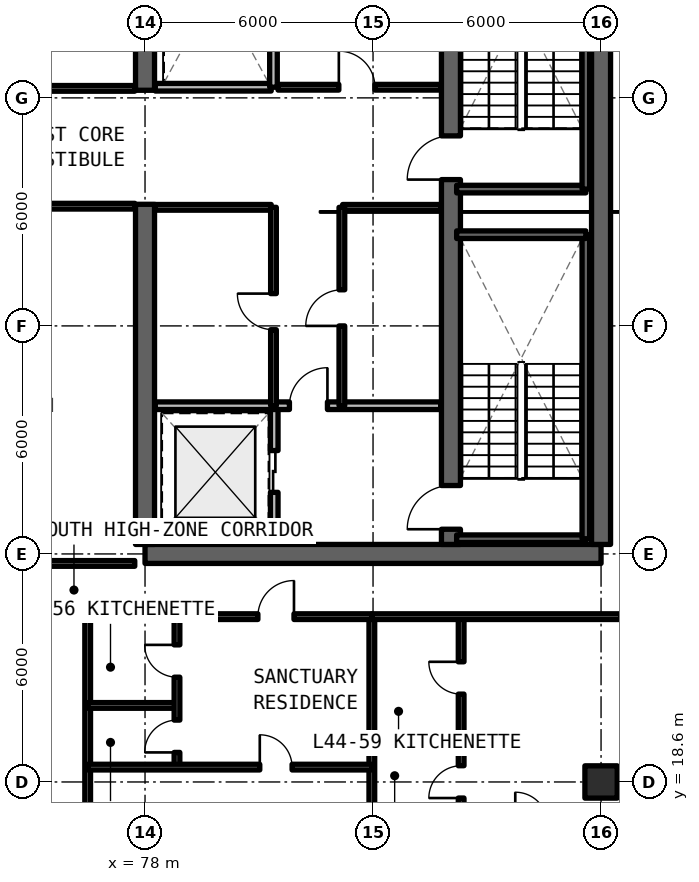
"""IFC4 building model, lengths in metres.
Left out: names, types, materials, properties, quantities, classifications, styles, units other than length and angle.
Written with IfcOpenShell. Run it as: python <this file> out.ifc"""

import sys

from ifc_helpers import new_model, si_unit, direction, frame, frame_2d, origin, origin_2d, place, context, subcontext, project, spatial, rectangle, extrude, element, fill, save


model = new_model("IFC4")
c1 = context("Model", 3, precision=1e-05, world=origin(), true_north=direction((0.0, 1.0)))
c2 = subcontext(c1, "Body", "Model", "MODEL_VIEW")
j1 = project(units=[si_unit("LENGTHUNIT", "METRE"), si_unit("PLANEANGLEUNIT", "RADIAN")], contexts=[c1])
p1 = place(None, origin())
s1 = spatial("IfcSite", under=j1, at=p1, CompositionType="ELEMENT")
p2 = place(p1, origin())
s2 = spatial("IfcBuilding", under=s1, at=p2, CompositionType="ELEMENT")
p3 = place(p2, frame((0.0, 0.0, 158.4)))
s3 = spatial("IfcBuildingStorey", under=s2, at=p3, CompositionType="ELEMENT", Elevation=158.4)
p4 = place(p3, frame((78.0, 24.6, 0.0), z_axis=(0.0, 0.0, 1.0), x_axis=(1.0, 0.0, 0.0)))
e1 = element("IfcWall", 1, at=p4, inside=s3, PredefinedType="SHEAR", context=c2, shape_type="SweptSolid", body=[
    extrude(rectangle(XDim=12.0, YDim=0.5, at=frame_2d((6.0, 0.0))), origin(), (0.0, 0.0, 1.0), 3.63),
])
p5 = place(p3, frame((90.0, 24.85, 0.0), z_axis=(0.0, 0.0, 1.0), x_axis=(0.0, 1.0, 0.0)))
e2 = element("IfcWall", 2, at=p5, inside=s3, PredefinedType="SHEAR", context=c2, shape_type="SweptSolid", body=[
    extrude(rectangle(XDim=17.5, YDim=0.5, at=frame_2d((8.75, 0.0))), origin(), (0.0, 0.0, 1.0), 3.63),
])
p6 = place(p3, frame((78.0, 24.85, 0.0), z_axis=(0.0, 0.0, 1.0), x_axis=(0.0, 1.0, 0.0)))
e3 = element("IfcWall", 3, at=p6, inside=s3, PredefinedType="SHEAR", context=c2, shape_type="SweptSolid", body=[
    extrude(rectangle(XDim=8.95, YDim=0.5, at=frame_2d((4.475, 0.0))), origin(), (0.0, 0.0, 1.0), 3.63),
])
p7 = place(p3, frame((78.0, 36.8, 0.0), z_axis=(0.0, 0.0, 1.0), x_axis=(0.0, 1.0, 0.0)))
e4 = element("IfcWall", 4, at=p7, inside=s3, PredefinedType="SHEAR", context=c2, shape_type="SweptSolid", body=[
    extrude(rectangle(XDim=5.55, YDim=0.5, at=frame_2d((2.775, 0.0))), origin(), (0.0, 0.0, 1.0), 3.63),
])
p8 = place(p3, frame((86.05, 24.85, 0.0), z_axis=(0.0, 0.0, 1.0), x_axis=(0.0, 1.0, 0.0)))
e5 = element("IfcWall", 5, at=p8, inside=s3, PredefinedType="SHEAR", context=c2, shape_type="SweptSolid", body=[
    extrude(rectangle(XDim=17.5, YDim=0.5, at=frame_2d((8.75, 0.0))), origin(), (0.0, 0.0, 1.0), 3.63),
])
p9 = place(p8, frame((0.4, 0.0, 0.0)))
e6 = element("IfcOpeningElement", 6, at=p9, cuts=e5, PredefinedType="OPENING", context=c2, shape_type="SweptSolid", body=[
    extrude(rectangle(XDim=1.15, YDim=2.15, at=frame_2d((0.575, 1.075))), frame((0.0, 0.26, 0.0), z_axis=(0.0, -1.0, 0.0), x_axis=(1.0, 0.0, 0.0)), (0.0, 0.0, 1.0), 0.52),
])
p10 = place(p8, frame((9.6, 0.0, 0.0)))
e7 = element("IfcOpeningElement", 7, at=p10, cuts=e5, PredefinedType="OPENING", context=c2, shape_type="SweptSolid", body=[
    extrude(rectangle(XDim=1.15, YDim=2.15, at=frame_2d((0.575, 1.075))), frame((0.0, 0.26, 0.0), z_axis=(0.0, -1.0, 0.0), x_axis=(1.0, 0.0, 0.0)), (0.0, 0.0, 1.0), 0.52),
])
p11 = place(p3, frame((90.0, 18.6, 0.0), z_axis=(0.0, 0.0, 1.0), x_axis=(1.0, 0.0, 0.0)))
e8 = element("IfcColumn", 8, at=p11, inside=s3, PredefinedType="COLUMN", context=c2, shape_type="SweptSolid", body=[
    extrude(rectangle(XDim=0.85, YDim=0.85, at=origin_2d()), origin(), (0.0, 0.0, 1.0), 3.63),
])
p12 = place(p3, frame((81.4, 24.92, 0.0), z_axis=(0.0, 0.0, 1.0), x_axis=(0.0, 1.0, 0.0)))
e9 = element("IfcWall", 9, at=p12, inside=s3, PredefinedType="SOLIDWALL", context=c2, shape_type="SweptSolid", body=[
    extrude(rectangle(XDim=3.58, YDim=0.2, at=frame_2d((1.79, 0.0))), origin(), (0.0, 0.0, 1.0), 2.63),
])
p13 = place(p12, frame((1.3, 0.0, 0.0)))
e10 = element("IfcOpeningElement", 10, at=p13, cuts=e9, PredefinedType="OPENING", context=c2, shape_type="SweptSolid", body=[
    extrude(rectangle(XDim=1.1, YDim=2.2, at=frame_2d((0.55, 1.1))), frame((0.0, 0.11, 0.0), z_axis=(0.0, -1.0, 0.0), x_axis=(1.0, 0.0, 0.0)), (0.0, 0.0, 1.0), 0.22),
])
p14 = place(p3, frame((78.27, 28.5, 0.0), z_axis=(0.0, 0.0, 1.0), x_axis=(1.0, 0.0, 0.0)))
e11 = element("IfcWall", 11, at=p14, inside=s3, PredefinedType="SOLIDWALL", context=c2, shape_type="SweptSolid", body=[
    extrude(rectangle(XDim=7.51, YDim=0.2, at=frame_2d((3.755, 0.0))), origin(), (0.0, 0.0, 1.0), 2.63),
])
p15 = place(p14, frame((3.53, 0.0, 0.0)))
e12 = element("IfcOpeningElement", 12, at=p15, cuts=e11, PredefinedType="OPENING", context=c2, shape_type="SweptSolid", body=[
    extrude(rectangle(XDim=1.0, YDim=2.15, at=frame_2d((0.5, 1.075))), frame((0.0, 0.11, 0.0), z_axis=(0.0, -1.0, 0.0), x_axis=(1.0, 0.0, 0.0)), (0.0, 0.0, 1.0), 0.22),
])
p16 = place(p3, frame((83.2, 33.72, 0.0), z_axis=(0.0, 0.0, 1.0), x_axis=(1.0, 0.0, 0.0)))
e13 = element("IfcWall", 13, at=p16, inside=s3, PredefinedType="SOLIDWALL", context=c2, shape_type="SweptSolid", body=[
    extrude(rectangle(XDim=2.58, YDim=0.15, at=frame_2d((1.29, 0.0))), origin(), (0.0, 0.0, 1.0), 2.63),
])
p17 = place(p3, frame((83.18, 28.5, 0.0), z_axis=(0.0, 0.0, 1.0), x_axis=(0.0, 1.0, 0.0)))
e14 = element("IfcWall", 14, at=p17, inside=s3, PredefinedType="SOLIDWALL", context=c2, shape_type="SweptSolid", body=[
    extrude(rectangle(XDim=5.22, YDim=0.15, at=frame_2d((2.61, 0.0))), origin(), (0.0, 0.0, 1.0), 2.63),
])
p18 = place(p17, frame((2.1, 0.0, 0.0)))
e15 = element("IfcOpeningElement", 15, at=p18, cuts=e14, PredefinedType="OPENING", context=c2, shape_type="SweptSolid", body=[
    extrude(rectangle(XDim=0.95, YDim=2.15, at=frame_2d((0.475, 1.075))), frame((0.0, 0.085, 0.0), z_axis=(0.0, -1.0, 0.0), x_axis=(1.0, 0.0, 0.0)), (0.0, 0.0, 1.0), 0.17),
])
p19 = place(p3, frame((78.27, 33.72, 0.0), z_axis=(0.0, 0.0, 1.0), x_axis=(1.0, 0.0, 0.0)))
e16 = element("IfcWall", 16, at=p19, inside=s3, PredefinedType="SOLIDWALL", context=c2, shape_type="SweptSolid", body=[
    extrude(rectangle(XDim=3.05, YDim=0.15, at=frame_2d((1.525, 0.0))), origin(), (0.0, 0.0, 1.0), 2.63),
])
p20 = place(p3, frame((81.38, 28.5, 0.0), z_axis=(0.0, 0.0, 1.0), x_axis=(0.0, 1.0, 0.0)))
e17 = element("IfcWall", 17, at=p20, inside=s3, PredefinedType="SOLIDWALL", context=c2, shape_type="SweptSolid", body=[
    extrude(rectangle(XDim=5.22, YDim=0.15, at=frame_2d((2.61, 0.0))), origin(), (0.0, 0.0, 1.0), 2.63),
])
p21 = place(p20, frame((2.0, 0.0, 0.0)))
e18 = element("IfcOpeningElement", 18, at=p21, cuts=e17, PredefinedType="OPENING", context=c2, shape_type="SweptSolid", body=[
    extrude(rectangle(XDim=0.95, YDim=2.15, at=frame_2d((0.475, 1.075))), frame((0.0, 0.085, 0.0), z_axis=(0.0, -1.0, 0.0), x_axis=(1.0, 0.0, 0.0)), (0.0, 0.0, 1.0), 0.17),
])
p22 = place(p3, frame((81.5, 36.88, 0.0), z_axis=(0.0, 0.0, 1.0), x_axis=(1.0, 0.0, 0.0)))
e19 = element("IfcWall", 19, at=p22, inside=s3, PredefinedType="SOLIDWALL", context=c2, shape_type="SweptSolid", body=[
    extrude(rectangle(XDim=4.28, YDim=0.15, at=frame_2d((2.14, 0.0))), origin(), (0.0, 0.0, 1.0), 2.63),
])
p23 = place(p22, frame((1.6, 0.0, 0.0)))
e20 = element("IfcOpeningElement", 20, at=p23, cuts=e19, PredefinedType="OPENING", context=c2, shape_type="SweptSolid", body=[
    extrude(rectangle(XDim=0.95, YDim=2.15, at=frame_2d((0.475, 1.075))), frame((0.0, 0.085, 0.0), z_axis=(0.0, -1.0, 0.0), x_axis=(1.0, 0.0, 0.0)), (0.0, 0.0, 1.0), 0.17),
])
p24 = place(p3, frame((78.27, 36.88, 0.0), z_axis=(0.0, 0.0, 1.0), x_axis=(1.0, 0.0, 0.0)))
e21 = element("IfcWall", 21, at=p24, inside=s3, PredefinedType="SOLIDWALL", context=c2, shape_type="SweptSolid", body=[
    extrude(rectangle(XDim=3.05, YDim=0.2, at=frame_2d((1.525, 0.0))), origin(), (0.0, 0.0, 1.0), 2.63),
])
p25 = place(p3, frame((81.38, 36.88, 0.0), z_axis=(0.0, 0.0, 1.0), x_axis=(0.0, 1.0, 0.0)))
e22 = element("IfcWall", 22, at=p25, inside=s3, PredefinedType="SOLIDWALL", context=c2, shape_type="SweptSolid", body=[
    extrude(rectangle(XDim=5.42, YDim=0.2, at=frame_2d((2.71, 0.0))), origin(), (0.0, 0.0, 1.0), 2.63),
])
p26 = place(p3, frame((69.85, 24.35, 0.0), z_axis=(0.0, 0.0, 1.0), x_axis=(1.0, 0.0, 0.0)))
e23 = element("IfcWall", 23, at=p26, inside=s3, PredefinedType="SOLIDWALL", context=c2, shape_type="SweptSolid", body=[
    extrude(rectangle(XDim=7.88, YDim=0.15, at=frame_2d((3.94, 0.0))), origin(), (0.0, 0.0, 1.0), 2.63),
])
p27 = place(p3, frame((69.85, 33.75, 0.0), z_axis=(0.0, 0.0, 1.0), x_axis=(1.0, 0.0, 0.0)))
e24 = element("IfcWall", 24, at=p27, inside=s3, PredefinedType="SOLIDWALL", context=c2, shape_type="SweptSolid", body=[
    extrude(rectangle(XDim=7.88, YDim=0.15, at=frame_2d((3.94, 0.0))), origin(), (0.0, 0.0, 1.0), 2.63),
])
p28 = place(p27, frame((3.465, 0.0, 0.0)))
e25 = element("IfcOpeningElement", 25, at=p28, cuts=e24, PredefinedType="OPENING", context=c2, shape_type="SweptSolid", body=[
    extrude(rectangle(XDim=0.95, YDim=2.15, at=frame_2d((0.475, 1.075))), frame((0.0, 0.085, 0.0), z_axis=(0.0, -1.0, 0.0), x_axis=(1.0, 0.0, 0.0)), (0.0, 0.0, 1.0), 0.17),
])
p29 = place(p3, frame((69.85, 36.85, 0.0), z_axis=(0.0, 0.0, 1.0), x_axis=(1.0, 0.0, 0.0)))
e26 = element("IfcWall", 26, at=p29, inside=s3, PredefinedType="SOLIDWALL", context=c2, shape_type="SweptSolid", body=[
    extrude(rectangle(XDim=7.88, YDim=0.15, at=frame_2d((3.94, 0.0))), origin(), (0.0, 0.0, 1.0), 2.63),
])
p30 = place(p29, frame((3.465, 0.0, 0.0)))
e27 = element("IfcOpeningElement", 27, at=p30, cuts=e26, PredefinedType="OPENING", context=c2, shape_type="SweptSolid", body=[
    extrude(rectangle(XDim=0.95, YDim=2.15, at=frame_2d((0.475, 1.075))), frame((0.0, 0.085, 0.0), z_axis=(0.0, -1.0, 0.0), x_axis=(1.0, 0.0, 0.0)), (0.0, 0.0, 1.0), 0.17),
])
p31 = place(p3, frame((76.491, 14.566, 0.0), z_axis=(0.0, 0.0, 1.0), x_axis=(0.0, 1.0, 0.0)))
e28 = element("IfcWall", 28, at=p31, inside=s3, PredefinedType="SOLIDWALL", context=c2, shape_type="SweptSolid", body=[
    extrude(rectangle(XDim=8.384, YDim=0.15, at=frame_2d((4.192, 0.0))), origin(), (0.0, 0.0, 1.0), 2.63),
])
p32 = place(p3, frame((66.521, 22.95, 0.0), z_axis=(0.0, 0.0, 1.0), x_axis=(1.0, 0.0, 0.0)))
e29 = element("IfcWall", 29, at=p32, inside=s3, PredefinedType="SOLIDWALL", context=c2, shape_type="SweptSolid", body=[
    extrude(rectangle(XDim=9.97, YDim=0.15, at=frame_2d((4.985, 0.0))), origin(), (0.0, 0.0, 1.0), 2.63),
])
p33 = place(p32, frame((3.635, 0.0, 0.0)))
e30 = element("IfcOpeningElement", 30, at=p33, cuts=e29, PredefinedType="OPENING", context=c2, shape_type="SweptSolid", body=[
    extrude(rectangle(XDim=1.1, YDim=2.15, at=frame_2d((0.55, 1.075))), frame((0.0, 0.085, 0.0), z_axis=(0.0, -1.0, 0.0), x_axis=(1.0, 0.0, 0.0)), (0.0, 0.0, 1.0), 0.17),
])
p34 = place(p3, frame((83.969, 14.89, 0.0), z_axis=(0.0, 0.0, 1.0), x_axis=(0.0, 1.0, 0.0)))
e31 = element("IfcWall", 31, at=p34, inside=s3, PredefinedType="SOLIDWALL", context=c2, shape_type="SweptSolid", body=[
    extrude(rectangle(XDim=8.06, YDim=0.15, at=frame_2d((4.03, 0.0))), origin(), (0.0, 0.0, 1.0), 2.63),
])
p35 = place(p3, frame((76.491, 20.614, 0.0), z_axis=(0.0, 0.0, 1.0), x_axis=(1.0, 0.0, 0.0)))
e32 = element("IfcWall", 32, at=p35, inside=s3, PredefinedType="PARTITIONING", context=c2, shape_type="SweptSolid", body=[
    extrude(rectangle(XDim=2.35, YDim=0.15, at=frame_2d((1.175, 0.0))), origin(), (0.0, 0.0, 1.0), 2.63),
])
p36 = place(p3, frame((78.841, 18.991, 0.0), z_axis=(0.0, 0.0, 1.0), x_axis=(0.0, 1.0, 0.0)))
e33 = element("IfcWall", 33, at=p36, inside=s3, PredefinedType="PARTITIONING", context=c2, shape_type="SweptSolid", body=[
    extrude(rectangle(XDim=3.959, YDim=0.15, at=frame_2d((1.979, 0.0))), origin(), (0.0, 0.0, 1.0), 2.63),
])
p37 = place(p36, frame((0.387, 0.0, 0.0)))
e34 = element("IfcOpeningElement", 34, at=p37, cuts=e33, PredefinedType="OPENING", context=c2, shape_type="SweptSolid", body=[
    extrude(rectangle(XDim=0.85, YDim=2.1, at=frame_2d((0.425, 1.05))), frame((0.0, 0.085, 0.0), z_axis=(0.0, -1.0, 0.0), x_axis=(1.0, 0.0, 0.0)), (0.0, 0.0, 1.0), 0.17),
])
p38 = place(p36, frame((2.366, 0.0, 0.0)))
e35 = element("IfcOpeningElement", 35, at=p38, cuts=e33, PredefinedType="OPENING", context=c2, shape_type="SweptSolid", body=[
    extrude(rectangle(XDim=0.85, YDim=2.1, at=frame_2d((0.425, 1.05))), frame((0.0, 0.085, 0.0), z_axis=(0.0, -1.0, 0.0), x_axis=(1.0, 0.0, 0.0)), (0.0, 0.0, 1.0), 0.17),
])
p39 = place(p3, frame((76.491, 18.991, 0.0), z_axis=(0.0, 0.0, 1.0), x_axis=(1.0, 0.0, 0.0)))
e36 = element("IfcWall", 36, at=p39, inside=s3, PredefinedType="PARTITIONING", context=c2, shape_type="SweptSolid", body=[
    extrude(rectangle(XDim=7.478, YDim=0.15, at=frame_2d((3.739, 0.0))), origin(), (0.0, 0.0, 1.0), 2.63),
])
p40 = place(p39, frame((4.529, 0.0, 0.0)))
e37 = element("IfcOpeningElement", 37, at=p40, cuts=e36, PredefinedType="OPENING", context=c2, shape_type="SweptSolid", body=[
    extrude(rectangle(XDim=0.85, YDim=2.1, at=frame_2d((0.425, 1.05))), frame((0.0, 0.085, 0.0), z_axis=(0.0, -1.0, 0.0), x_axis=(1.0, 0.0, 0.0)), (0.0, 0.0, 1.0), 0.17),
])
p41 = place(p3, frame((76.491, 22.95, 0.0), z_axis=(0.0, 0.0, 1.0), x_axis=(1.0, 0.0, 0.0)))
e38 = element("IfcWall", 38, at=p41, inside=s3, PredefinedType="SOLIDWALL", context=c2, shape_type="SweptSolid", body=[
    extrude(rectangle(XDim=7.478, YDim=0.15, at=frame_2d((3.739, 0.0))), origin(), (0.0, 0.0, 1.0), 2.63),
])
p42 = place(p41, frame((4.479, 0.0, 0.0)))
e39 = element("IfcOpeningElement", 39, at=p42, cuts=e38, PredefinedType="OPENING", context=c2, shape_type="SweptSolid", body=[
    extrude(rectangle(XDim=0.95, YDim=2.15, at=frame_2d((0.475, 1.075))), frame((0.0, 0.085, 0.0), z_axis=(0.0, -1.0, 0.0), x_axis=(1.0, 0.0, 0.0)), (0.0, 0.0, 1.0), 0.17),
])
p43 = place(p3, frame((83.969, 19.723, 0.0), z_axis=(0.0, 0.0, 1.0), x_axis=(1.0, 0.0, 0.0)))
e40 = element("IfcWall", 40, at=p43, inside=s3, PredefinedType="PARTITIONING", context=c2, shape_type="SweptSolid", body=[
    extrude(rectangle(XDim=2.35, YDim=0.15, at=frame_2d((1.175, 0.0))), origin(), (0.0, 0.0, 1.0), 2.63),
])
p44 = place(p3, frame((86.318, 17.481, 0.0), z_axis=(0.0, 0.0, 1.0), x_axis=(0.0, 1.0, 0.0)))
e41 = element("IfcWall", 41, at=p44, inside=s3, PredefinedType="PARTITIONING", context=c2, shape_type="SweptSolid", body=[
    extrude(rectangle(XDim=5.469, YDim=0.15, at=frame_2d((2.734, 0.0))), origin(), (0.0, 0.0, 1.0), 2.63),
])
p45 = place(p44, frame((0.696, 0.0, 0.0)))
e42 = element("IfcOpeningElement", 42, at=p45, cuts=e41, PredefinedType="OPENING", context=c2, shape_type="SweptSolid", body=[
    extrude(rectangle(XDim=0.85, YDim=2.1, at=frame_2d((0.425, 1.05))), frame((0.0, 0.085, 0.0), z_axis=(0.0, -1.0, 0.0), x_axis=(1.0, 0.0, 0.0)), (0.0, 0.0, 1.0), 0.17),
])
p46 = place(p44, frame((3.431, 0.0, 0.0)))
e43 = element("IfcOpeningElement", 43, at=p46, cuts=e41, PredefinedType="OPENING", context=c2, shape_type="SweptSolid", body=[
    extrude(rectangle(XDim=0.85, YDim=2.1, at=frame_2d((0.425, 1.05))), frame((0.0, 0.085, 0.0), z_axis=(0.0, -1.0, 0.0), x_axis=(1.0, 0.0, 0.0)), (0.0, 0.0, 1.0), 0.17),
])
p47 = place(p3, frame((83.969, 22.95, 0.0), z_axis=(0.0, 0.0, 1.0), x_axis=(1.0, 0.0, 0.0)))
e44 = element("IfcWall", 44, at=p47, inside=s3, PredefinedType="SOLIDWALL", context=c2, shape_type="SweptSolid", body=[
    extrude(rectangle(XDim=11.632, YDim=0.15, at=frame_2d((5.816, 0.0))), origin(), (0.0, 0.0, 1.0), 2.63),
])
p48 = place(p47, frame((6.556, 0.0, 0.0)))
e45 = element("IfcOpeningElement", 45, at=p48, cuts=e44, PredefinedType="OPENING", context=c2, shape_type="SweptSolid", body=[
    extrude(rectangle(XDim=0.95, YDim=2.15, at=frame_2d((0.475, 1.075))), frame((0.0, 0.085, 0.0), z_axis=(0.0, -1.0, 0.0), x_axis=(1.0, 0.0, 0.0)), (0.0, 0.0, 1.0), 0.17),
])
p49 = place(p3, frame((86.2, 25.0, 0.0), z_axis=(0.0, 0.0, 1.0), x_axis=(1.0, 0.0, 0.0)))
e46 = element("IfcWall", 46, at=p49, inside=s3, PredefinedType="SOLIDWALL", context=c2, shape_type="SweptSolid", body=[
    extrude(rectangle(XDim=3.4, YDim=0.2, at=frame_2d((1.7, 0.0))), origin(), (0.0, 0.0, 1.0), 3.63),
])
p50 = place(p3, frame((89.6, 25.0, 0.0), z_axis=(0.0, 0.0, 1.0), x_axis=(0.0, 1.0, 0.0)))
e47 = element("IfcWall", 47, at=p50, inside=s3, PredefinedType="SOLIDWALL", context=c2, shape_type="SweptSolid", body=[
    extrude(rectangle(XDim=8.0, YDim=0.2, at=frame_2d((4.0, 0.0))), origin(), (0.0, 0.0, 1.0), 3.63),
])
for number, where, z_axis, x_axis in (
    (48, (89.6, 33.0, 0.0), (0.0, 0.0, 1.0), (-1.0, 0.0, 0.0)),
    (49, (86.2, 34.2, 0.0), (0.0, 0.0, 1.0), (1.0, 0.0, 0.0)),
):
    element("IfcWall", number, at=place(p3, frame(where, z_axis=z_axis, x_axis=x_axis)), inside=s3, PredefinedType="SOLIDWALL", context=c2, shape_type="SweptSolid", body=[
        extrude(rectangle(XDim=3.4, YDim=0.2, at=frame_2d((1.7, 0.0))), origin(), (0.0, 0.0, 1.0), 3.63),
    ])
p51 = place(p3, frame((89.6, 34.2, 0.0), z_axis=(0.0, 0.0, 1.0), x_axis=(0.0, 1.0, 0.0)))
e50 = element("IfcWall", 50, at=p51, inside=s3, PredefinedType="SOLIDWALL", context=c2, shape_type="SweptSolid", body=[
    extrude(rectangle(XDim=8.0, YDim=0.2, at=frame_2d((4.0, 0.0))), origin(), (0.0, 0.0, 1.0), 3.63),
])
p52 = place(p13, origin())
e51 = element("IfcDoor", 51, at=p52, inside=s3, OperationType="SLIDING_TO_LEFT", PredefinedType="DOOR", context=c2, shape_type="SweptSolid", body=[
    extrude(rectangle(XDim=1.1, YDim=2.2, at=frame_2d((0.55, 1.1))), frame((0.0, 0.025, 0.0), z_axis=(0.0, -1.0, 0.0), x_axis=(1.0, 0.0, 0.0)), (0.0, 0.0, 1.0), 0.05),
])
fill(e10, e51)
p53 = place(p15, origin())
e52 = element("IfcDoor", 52, at=p53, inside=s3, OperationType="SINGLE_SWING_RIGHT", PredefinedType="DOOR", context=c2, shape_type="SweptSolid", body=[
    extrude(rectangle(XDim=1.0, YDim=2.15, at=frame_2d((0.5, 1.075))), frame((0.0, 0.025, 0.0), z_axis=(0.0, -1.0, 0.0), x_axis=(1.0, 0.0, 0.0)), (0.0, 0.0, 1.0), 0.05),
])
fill(e12, e52)
p54 = place(p18, origin())
e53 = element("IfcDoor", 53, at=p54, inside=s3, OperationType="SINGLE_SWING_LEFT", PredefinedType="DOOR", context=c2, shape_type="SweptSolid", body=[
    extrude(rectangle(XDim=0.95, YDim=2.15, at=frame_2d((0.475, 1.075))), frame((0.0, 0.025, 0.0), z_axis=(0.0, -1.0, 0.0), x_axis=(1.0, 0.0, 0.0)), (0.0, 0.0, 1.0), 0.05),
])
fill(e15, e53)
p55 = place(p21, origin())
e54 = element("IfcDoor", 54, at=p55, inside=s3, OperationType="SINGLE_SWING_RIGHT", PredefinedType="DOOR", context=c2, shape_type="SweptSolid", body=[
    extrude(rectangle(XDim=0.95, YDim=2.15, at=frame_2d((0.475, 1.075))), frame((0.0, 0.025, 0.0), z_axis=(0.0, -1.0, 0.0), x_axis=(1.0, 0.0, 0.0)), (0.0, 0.0, 1.0), 0.05),
])
fill(e18, e54)
p56 = place(p23, origin())
e55 = element("IfcDoor", 55, at=p56, inside=s3, OperationType="SINGLE_SWING_LEFT", PredefinedType="DOOR", context=c2, shape_type="SweptSolid", body=[
    extrude(rectangle(XDim=0.95, YDim=2.15, at=frame_2d((0.475, 1.075))), frame((0.0, 0.025, 0.0), z_axis=(0.0, -1.0, 0.0), x_axis=(1.0, 0.0, 0.0)), (0.0, 0.0, 1.0), 0.05),
])
fill(e20, e55)
p57 = place(p37, origin())
e56 = element("IfcDoor", 56, at=p57, inside=s3, OperationType="SINGLE_SWING_LEFT", PredefinedType="DOOR", context=c2, shape_type="SweptSolid", body=[
    extrude(rectangle(XDim=0.85, YDim=2.1, at=frame_2d((0.425, 1.05))), frame((0.0, 0.025, 0.0), z_axis=(0.0, -1.0, 0.0), x_axis=(1.0, 0.0, 0.0)), (0.0, 0.0, 1.0), 0.05),
])
fill(e34, e56)
p58 = place(p38, origin())
e57 = element("IfcDoor", 57, at=p58, inside=s3, OperationType="SINGLE_SWING_RIGHT", PredefinedType="DOOR", context=c2, shape_type="SweptSolid", body=[
    extrude(rectangle(XDim=0.85, YDim=2.1, at=frame_2d((0.425, 1.05))), frame((0.0, 0.025, 0.0), z_axis=(0.0, -1.0, 0.0), x_axis=(1.0, 0.0, 0.0)), (0.0, 0.0, 1.0), 0.05),
])
fill(e35, e57)
p59 = place(p40, origin())
e58 = element("IfcDoor", 58, at=p59, inside=s3, OperationType="SINGLE_SWING_LEFT", PredefinedType="DOOR", context=c2, shape_type="SweptSolid", body=[
    extrude(rectangle(XDim=0.85, YDim=2.1, at=frame_2d((0.425, 1.05))), frame((0.0, 0.025, 0.0), z_axis=(0.0, -1.0, 0.0), x_axis=(1.0, 0.0, 0.0)), (0.0, 0.0, 1.0), 0.05),
])
fill(e37, e58)
p60 = place(p42, origin())
e59 = element("IfcDoor", 59, at=p60, inside=s3, OperationType="SINGLE_SWING_RIGHT", PredefinedType="DOOR", context=c2, shape_type="SweptSolid", body=[
    extrude(rectangle(XDim=0.95, YDim=2.15, at=frame_2d((0.475, 1.075))), frame((0.0, 0.025, 0.0), z_axis=(0.0, -1.0, 0.0), x_axis=(1.0, 0.0, 0.0)), (0.0, 0.0, 1.0), 0.05),
])
fill(e39, e59)
p61 = place(p45, origin())
e60 = element("IfcDoor", 60, at=p61, inside=s3, OperationType="SINGLE_SWING_LEFT", PredefinedType="DOOR", context=c2, shape_type="SweptSolid", body=[
    extrude(rectangle(XDim=0.85, YDim=2.1, at=frame_2d((0.425, 1.05))), frame((0.0, 0.025, 0.0), z_axis=(0.0, -1.0, 0.0), x_axis=(1.0, 0.0, 0.0)), (0.0, 0.0, 1.0), 0.05),
])
fill(e42, e60)
p62 = place(p46, origin())
e61 = element("IfcDoor", 61, at=p62, inside=s3, OperationType="SINGLE_SWING_RIGHT", PredefinedType="DOOR", context=c2, shape_type="SweptSolid", body=[
    extrude(rectangle(XDim=0.85, YDim=2.1, at=frame_2d((0.425, 1.05))), frame((0.0, 0.025, 0.0), z_axis=(0.0, -1.0, 0.0), x_axis=(1.0, 0.0, 0.0)), (0.0, 0.0, 1.0), 0.05),
])
fill(e43, e61)
p63 = place(p9, origin())
e62 = element("IfcDoor", 62, at=p63, inside=s3, OperationType="SINGLE_SWING_LEFT", PredefinedType="DOOR", context=c2, shape_type="SweptSolid", body=[
    extrude(rectangle(XDim=1.15, YDim=2.15, at=frame_2d((0.575, 1.075))), frame((0.0, 0.025, 0.0), z_axis=(0.0, -1.0, 0.0), x_axis=(1.0, 0.0, 0.0)), (0.0, 0.0, 1.0), 0.05),
])
fill(e6, e62)
p64 = place(p10, origin())
e63 = element("IfcDoor", 63, at=p64, inside=s3, OperationType="SINGLE_SWING_RIGHT", PredefinedType="DOOR", context=c2, shape_type="SweptSolid", body=[
    extrude(rectangle(XDim=1.15, YDim=2.15, at=frame_2d((0.575, 1.075))), frame((0.0, 0.025, 0.0), z_axis=(0.0, -1.0, 0.0), x_axis=(1.0, 0.0, 0.0)), (0.0, 0.0, 1.0), 0.05),
])
fill(e7, e63)
save(model, sys.argv[1])
